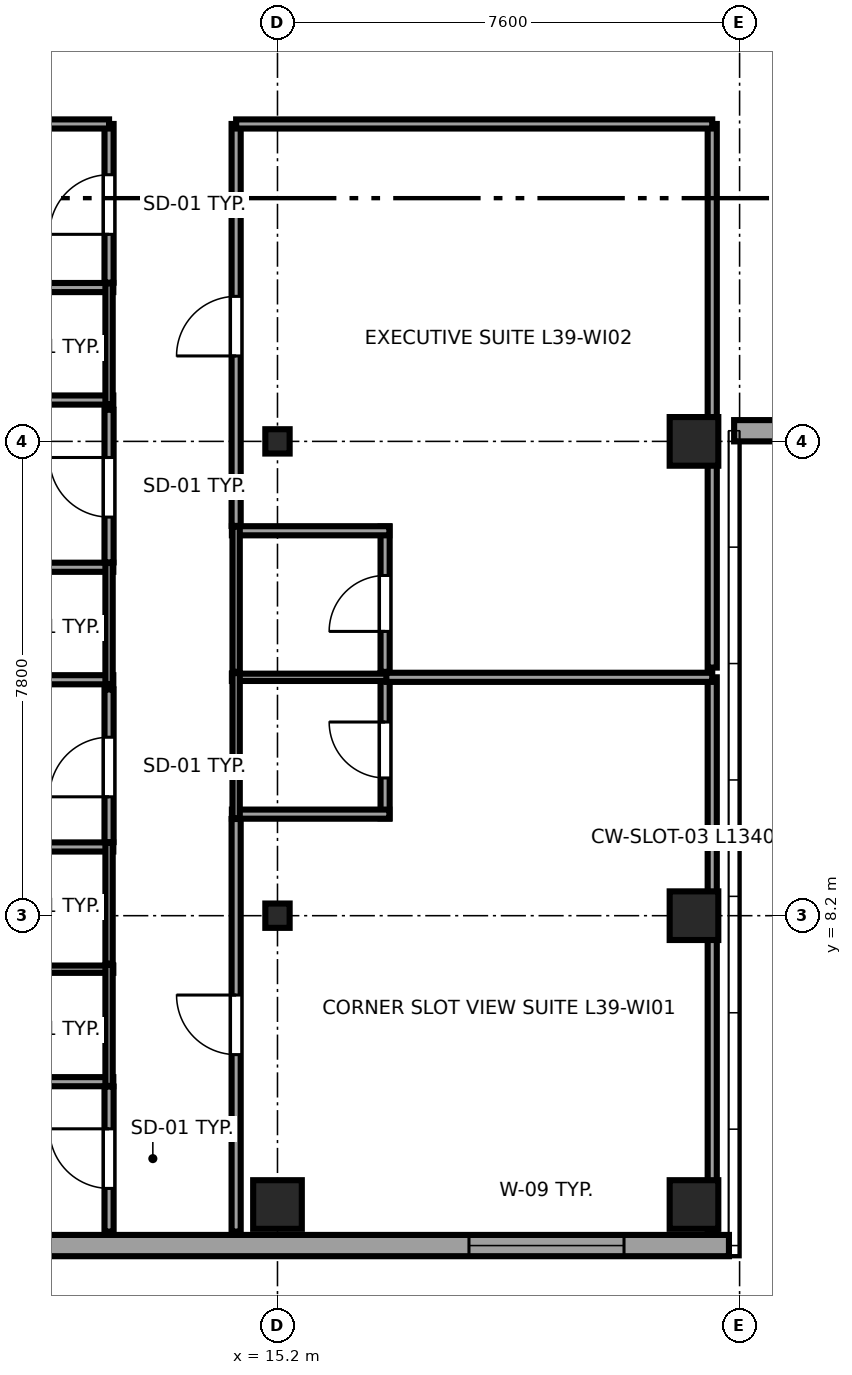
"""IFC4 building model, lengths in metres.
Left out: names, types, materials, properties, quantities, classifications, styles, units other than length and angle.
Written with IfcOpenShell. Run it as: python <this file> out.ifc"""

import sys

from ifc_helpers import new_model, si_unit, direction, frame, frame_2d, origin, origin_2d, place, context, subcontext, project, spatial, rectangle, i_section, extrude, source, transform, mapped, element, fill, save


model = new_model("IFC4")
c1 = context("Model", 3, precision=1e-05, world=origin(), true_north=direction((0.0, 1.0)))
c2 = subcontext(c1, "Body", "Model", "MODEL_VIEW")
j1 = project(units=[si_unit("LENGTHUNIT", "METRE"), si_unit("PLANEANGLEUNIT", "RADIAN")], contexts=[c1])
p1 = place(None, origin())
s1 = spatial("IfcSite", under=j1, at=p1, CompositionType="ELEMENT")
p2 = place(p1, origin())
s2 = spatial("IfcBuilding", under=s1, at=p2, CompositionType="ELEMENT")
p3 = place(p2, frame((0.0, 0.0, 150.6)))
s3 = spatial("IfcBuildingStorey", under=s2, at=p3, CompositionType="ELEMENT", Elevation=150.6)
m1 = source(origin(), c2, "Body", "SweptSolid", [
    extrude(rectangle(XDim=0.8, YDim=0.8, at=origin_2d()), origin(), (0.0, 0.0, 1.0), 3.55),
])
p4 = place(p3, frame((15.2, 3.45, 0.0), z_axis=(0.0, 0.0, 1.0), x_axis=(1.0, 0.0, 0.0)))
e1 = element("IfcColumn", 1, at=p4, inside=s3, PredefinedType="COLUMN", context=c2, shape_type="MappedRepresentation", body=[
    mapped(m1, transform((0.0, 0.0, 0.0), x_axis=(1.0, 0.0, 0.0), y_axis=(0.0, 1.0, 0.0), z_axis=(0.0, 0.0, 1.0), scale=1.0)),
])
m2 = source(origin(), c2, "Body", "SweptSolid", [
    extrude(i_section(OverallWidth=0.4, OverallDepth=0.4, WebThickness=0.02, FlangeThickness=0.035, at=origin_2d()), origin(), (0.0, 0.0, 1.0), 3.55),
])
for number, where, z_axis, x_axis in (
    (2, (15.2, 8.2, 0.0), (0.0, 0.0, 1.0), (1.0, 0.0, 0.0)),
    (3, (15.2, 16.0, 0.0), (0.0, 0.0, 1.0), (1.0, 0.0, 0.0)),
):
    element("IfcColumn", number, at=place(p3, frame(where, z_axis=z_axis, x_axis=x_axis)), inside=s3, PredefinedType="COLUMN", context=c2, shape_type="MappedRepresentation", body=[
        mapped(m2, transform((0.0, 0.0, 0.0), x_axis=(1.0, 0.0, 0.0), y_axis=(0.0, 1.0, 0.0), z_axis=(0.0, 0.0, 1.0), scale=1.0)),
    ])
for number, where, z_axis, x_axis in (
    (4, (22.05, 3.45, 0.0), (0.0, 0.0, 1.0), (1.0, 0.0, 0.0)),
    (5, (22.05, 8.2, 0.0), (0.0, 0.0, 1.0), (1.0, 0.0, 0.0)),
    (6, (22.05, 16.0, 0.0), (0.0, 0.0, 1.0), (1.0, 0.0, 0.0)),
):
    element("IfcColumn", number, at=place(p3, frame(where, z_axis=z_axis, x_axis=x_axis)), inside=s3, PredefinedType="COLUMN", context=c2, shape_type="MappedRepresentation", body=[
        mapped(m1, transform((0.0, 0.0, 0.0), x_axis=(1.0, 0.0, 0.0), y_axis=(0.0, 1.0, 0.0), z_axis=(0.0, 0.0, 1.0), scale=1.0)),
    ])
p5 = place(p3, frame((7.017, 2.775, 0.0), z_axis=(0.0, 0.0, 1.0), x_axis=(1.0, 0.0, 0.0)))
e7 = element("IfcWall", 7, at=p5, inside=s3, PredefinedType="SOLIDWALL", context=c2, shape_type="SweptSolid", body=[
    extrude(rectangle(XDim=15.608, YDim=0.35, at=frame_2d((7.804, 0.0))), origin(), (0.0, 0.0, 1.0), 3.37),
])
p6 = place(p5, frame((1.726, 0.0, 0.68)))
e8 = element("IfcOpeningElement", 8, at=p6, cuts=e7, PredefinedType="OPENING", context=c2, shape_type="SweptSolid", body=[
    extrude(rectangle(XDim=2.55, YDim=1.92, at=frame_2d((1.275, 0.96))), frame((0.0, 0.185, 0.0), z_axis=(0.0, -1.0, 0.0), x_axis=(1.0, 0.0, 0.0)), (0.0, 0.0, 1.0), 0.37),
])
p7 = place(p5, frame((11.332, 0.0, 0.68)))
e9 = element("IfcOpeningElement", 9, at=p7, cuts=e7, PredefinedType="OPENING", context=c2, shape_type="SweptSolid", body=[
    extrude(rectangle(XDim=2.55, YDim=1.92, at=frame_2d((1.275, 0.96))), frame((0.0, 0.185, 0.0), z_axis=(0.0, -1.0, 0.0), x_axis=(1.0, 0.0, 0.0)), (0.0, 0.0, 1.0), 0.37),
])
p8 = place(p3, frame((22.71, 16.175, 0.0), z_axis=(0.0, 0.0, 1.0), x_axis=(1.0, 0.0, 0.0)))
e10 = element("IfcWall", 10, at=p8, inside=s3, PredefinedType="SOLIDWALL", context=c2, shape_type="SweptSolid", body=[
    extrude(rectangle(XDim=11.58, YDim=0.35, at=frame_2d((5.79, 0.0))), origin(), (0.0, 0.0, 1.0), 2.16),
])
p9 = place(p3, frame((9.91, 5.47, 0.0), z_axis=(0.0, 0.0, 1.0), x_axis=(1.0, 0.0, 0.0)))
e11 = element("IfcWall", 11, at=p9, inside=s3, PredefinedType="PARTITIONING", context=c2, shape_type="SweptSolid", body=[
    extrude(rectangle(XDim=2.59, YDim=0.15, at=frame_2d((1.295, 0.0))), origin(), (0.0, 0.0, 1.0), 3.37),
])
p10 = place(p3, frame((9.91, 7.32, 0.0), z_axis=(0.0, 0.0, 1.0), x_axis=(1.0, 0.0, 0.0)))
e12 = element("IfcWall", 12, at=p10, inside=s3, PredefinedType="PLUMBINGWALL", context=c2, shape_type="SweptSolid", body=[
    extrude(rectangle(XDim=2.59, YDim=0.12, at=frame_2d((1.295, 0.0))), origin(), (0.0, 0.0, 1.0), 3.37),
])
p11 = place(p3, frame((12.43, 5.4, 0.0), z_axis=(0.0, 0.0, 1.0), x_axis=(0.0, 1.0, 0.0)))
e13 = element("IfcWall", 13, at=p11, inside=s3, PredefinedType="PLUMBINGWALL", context=c2, shape_type="SweptSolid", body=[
    extrude(rectangle(XDim=1.99, YDim=0.12, at=frame_2d((0.995, 0.0))), origin(), (0.0, 0.0, 1.0), 3.37),
])
p12 = place(p3, frame((9.91, 9.33, 0.0), z_axis=(0.0, 0.0, 1.0), x_axis=(1.0, 0.0, 0.0)))
e14 = element("IfcWall", 14, at=p12, inside=s3, PredefinedType="PARTITIONING", context=c2, shape_type="SweptSolid", body=[
    extrude(rectangle(XDim=2.59, YDim=0.15, at=frame_2d((1.295, 0.0))), origin(), (0.0, 0.0, 1.0), 3.37),
])
p13 = place(p3, frame((12.43, 7.41, 0.0), z_axis=(0.0, 0.0, 1.0), x_axis=(0.0, 1.0, 0.0)))
e15 = element("IfcWall", 15, at=p13, inside=s3, PredefinedType="PLUMBINGWALL", context=c2, shape_type="SweptSolid", body=[
    extrude(rectangle(XDim=1.99, YDim=0.12, at=frame_2d((0.995, 0.0))), origin(), (0.0, 0.0, 1.0), 3.37),
])
p14 = place(p3, frame((3.005, 12.08, 0.0), z_axis=(0.0, 0.0, 1.0), x_axis=(1.0, 0.0, 0.0)))
e16 = element("IfcWall", 16, at=p14, inside=s3, PredefinedType="PARTITIONING", context=c2, shape_type="SweptSolid", body=[
    extrude(rectangle(XDim=9.495, YDim=0.15, at=frame_2d((4.748, 0.0))), origin(), (0.0, 0.0, 1.0), 3.37),
])
p15 = place(p3, frame((9.91, 13.93, 0.0), z_axis=(0.0, 0.0, 1.0), x_axis=(1.0, 0.0, 0.0)))
e17 = element("IfcWall", 17, at=p15, inside=s3, PredefinedType="PARTITIONING", context=c2, shape_type="SweptSolid", body=[
    extrude(rectangle(XDim=2.59, YDim=0.15, at=frame_2d((1.295, 0.0))), origin(), (0.0, 0.0, 1.0), 3.37),
])
p16 = place(p3, frame((12.43, 12.01, 0.0), z_axis=(0.0, 0.0, 1.0), x_axis=(0.0, 1.0, 0.0)))
e18 = element("IfcWall", 18, at=p16, inside=s3, PredefinedType="PLUMBINGWALL", context=c2, shape_type="SweptSolid", body=[
    extrude(rectangle(XDim=1.99, YDim=0.12, at=frame_2d((0.995, 0.0))), origin(), (0.0, 0.0, 1.0), 3.37),
])
p17 = place(p3, frame((3.005, 16.68, 0.0), z_axis=(0.0, 0.0, 1.0), x_axis=(1.0, 0.0, 0.0)))
e19 = element("IfcWall", 19, at=p17, inside=s3, PredefinedType="PARTITIONING", context=c2, shape_type="SweptSolid", body=[
    extrude(rectangle(XDim=9.495, YDim=0.15, at=frame_2d((4.748, 0.0))), origin(), (0.0, 0.0, 1.0), 3.37),
])
p18 = place(p3, frame((9.91, 18.53, 0.0), z_axis=(0.0, 0.0, 1.0), x_axis=(1.0, 0.0, 0.0)))
e20 = element("IfcWall", 20, at=p18, inside=s3, PredefinedType="PARTITIONING", context=c2, shape_type="SweptSolid", body=[
    extrude(rectangle(XDim=2.59, YDim=0.15, at=frame_2d((1.295, 0.0))), origin(), (0.0, 0.0, 1.0), 3.37),
])
p19 = place(p3, frame((12.43, 16.61, 0.0), z_axis=(0.0, 0.0, 1.0), x_axis=(0.0, 1.0, 0.0)))
e21 = element("IfcWall", 21, at=p19, inside=s3, PredefinedType="PLUMBINGWALL", context=c2, shape_type="SweptSolid", body=[
    extrude(rectangle(XDim=1.99, YDim=0.12, at=frame_2d((0.995, 0.0))), origin(), (0.0, 0.0, 1.0), 3.37),
])
p20 = place(p3, frame((16.97, 9.8, 0.0), z_axis=(0.0, 0.0, 1.0), x_axis=(0.0, 1.0, 0.0)))
e22 = element("IfcWall", 22, at=p20, inside=s3, PredefinedType="PARTITIONING", context=c2, shape_type="SweptSolid", body=[
    extrude(rectangle(XDim=2.39, YDim=0.15, at=frame_2d((1.195, 0.0))), origin(), (0.0, 0.0, 1.0), 3.37),
])
p21 = place(p20, frame((0.665, 0.0, 0.0)))
e23 = element("IfcOpeningElement", 23, at=p21, cuts=e22, PredefinedType="OPENING", context=c2, shape_type="SweptSolid", body=[
    extrude(rectangle(XDim=0.92, YDim=2.01, at=frame_2d((0.46, 1.005))), frame((0.0, 0.085, 0.0), z_axis=(0.0, -1.0, 0.0), x_axis=(1.0, 0.0, 0.0)), (0.0, 0.0, 1.0), 0.17),
])
p22 = place(p3, frame((14.45, 9.87, 0.0), z_axis=(0.0, 0.0, 1.0), x_axis=(1.0, 0.0, 0.0)))
e24 = element("IfcWall", 24, at=p22, inside=s3, PredefinedType="PARTITIONING", context=c2, shape_type="SweptSolid", body=[
    extrude(rectangle(XDim=2.59, YDim=0.15, at=frame_2d((1.295, 0.0))), origin(), (0.0, 0.0, 1.0), 3.37),
])
p23 = place(p3, frame((14.45, 12.12, 0.0), z_axis=(0.0, 0.0, 1.0), x_axis=(1.0, 0.0, 0.0)))
e25 = element("IfcWall", 25, at=p23, inside=s3, PredefinedType="PLUMBINGWALL", context=c2, shape_type="SweptSolid", body=[
    extrude(rectangle(XDim=2.59, YDim=0.12, at=frame_2d((1.295, 0.0))), origin(), (0.0, 0.0, 1.0), 3.37),
])
p24 = place(p3, frame((14.52, 9.8, 0.0), z_axis=(0.0, 0.0, 1.0), x_axis=(0.0, 1.0, 0.0)))
e26 = element("IfcWall", 26, at=p24, inside=s3, PredefinedType="PLUMBINGWALL", context=c2, shape_type="SweptSolid", body=[
    extrude(rectangle(XDim=2.39, YDim=0.12, at=frame_2d((1.195, 0.0))), origin(), (0.0, 0.0, 1.0), 3.37),
])
p25 = place(p3, frame((16.97, 12.21, 0.0), z_axis=(0.0, 0.0, 1.0), x_axis=(0.0, 1.0, 0.0)))
e27 = element("IfcWall", 27, at=p25, inside=s3, PredefinedType="PARTITIONING", context=c2, shape_type="SweptSolid", body=[
    extrude(rectangle(XDim=2.39, YDim=0.15, at=frame_2d((1.195, 0.0))), origin(), (0.0, 0.0, 1.0), 3.37),
])
p26 = place(p25, frame((0.665, 0.0, 0.0)))
e28 = element("IfcOpeningElement", 28, at=p26, cuts=e27, PredefinedType="OPENING", context=c2, shape_type="SweptSolid", body=[
    extrude(rectangle(XDim=0.92, YDim=2.01, at=frame_2d((0.46, 1.005))), frame((0.0, 0.085, 0.0), z_axis=(0.0, -1.0, 0.0), x_axis=(1.0, 0.0, 0.0)), (0.0, 0.0, 1.0), 0.17),
])
p27 = place(p3, frame((14.45, 14.53, 0.0), z_axis=(0.0, 0.0, 1.0), x_axis=(1.0, 0.0, 0.0)))
e29 = element("IfcWall", 29, at=p27, inside=s3, PredefinedType="PARTITIONING", context=c2, shape_type="SweptSolid", body=[
    extrude(rectangle(XDim=2.59, YDim=0.15, at=frame_2d((1.295, 0.0))), origin(), (0.0, 0.0, 1.0), 3.37),
])
p28 = place(p3, frame((14.52, 12.21, 0.0), z_axis=(0.0, 0.0, 1.0), x_axis=(0.0, 1.0, 0.0)))
e30 = element("IfcWall", 30, at=p28, inside=s3, PredefinedType="PLUMBINGWALL", context=c2, shape_type="SweptSolid", body=[
    extrude(rectangle(XDim=2.39, YDim=0.12, at=frame_2d((1.195, 0.0))), origin(), (0.0, 0.0, 1.0), 3.37),
])
p29 = place(p3, frame((12.43, 3.005, 0.0), z_axis=(0.0, 0.0, 1.0), x_axis=(0.0, 1.0, 0.0)))
e31 = element("IfcWall", 31, at=p29, inside=s3, PredefinedType="PARTITIONING", context=c2, shape_type="SweptSolid", body=[
    extrude(rectangle(XDim=2.385, YDim=0.15, at=frame_2d((1.192, 0.0))), origin(), (0.0, 0.0, 1.0), 3.37),
])
p30 = place(p29, frame((0.71, 0.0, 0.0)))
e32 = element("IfcOpeningElement", 32, at=p30, cuts=e31, PredefinedType="OPENING", context=c2, shape_type="SweptSolid", body=[
    extrude(rectangle(XDim=0.98, YDim=2.12, at=frame_2d((0.49, 1.06))), frame((0.0, 0.085, 0.0), z_axis=(0.0, -1.0, 0.0), x_axis=(1.0, 0.0, 0.0)), (0.0, 0.0, 1.0), 0.17),
])
p31 = place(p3, frame((12.43, 9.41, 0.0), z_axis=(0.0, 0.0, 1.0), x_axis=(0.0, 1.0, 0.0)))
e33 = element("IfcWall", 33, at=p31, inside=s3, PredefinedType="PARTITIONING", context=c2, shape_type="SweptSolid", body=[
    extrude(rectangle(XDim=2.51, YDim=0.15, at=frame_2d((1.255, 0.0))), origin(), (0.0, 0.0, 1.0), 3.37),
])
p32 = place(p31, frame((0.745, 0.0, 0.0)))
e34 = element("IfcOpeningElement", 34, at=p32, cuts=e33, PredefinedType="OPENING", context=c2, shape_type="SweptSolid", body=[
    extrude(rectangle(XDim=0.98, YDim=2.12, at=frame_2d((0.49, 1.06))), frame((0.0, 0.085, 0.0), z_axis=(0.0, -1.0, 0.0), x_axis=(1.0, 0.0, 0.0)), (0.0, 0.0, 1.0), 0.17),
])
p33 = place(p3, frame((12.43, 14.01, 0.0), z_axis=(0.0, 0.0, 1.0), x_axis=(0.0, 1.0, 0.0)))
e35 = element("IfcWall", 35, at=p33, inside=s3, PredefinedType="PARTITIONING", context=c2, shape_type="SweptSolid", body=[
    extrude(rectangle(XDim=2.51, YDim=0.15, at=frame_2d((1.255, 0.0))), origin(), (0.0, 0.0, 1.0), 3.37),
])
p34 = place(p33, frame((0.745, 0.0, 0.0)))
e36 = element("IfcOpeningElement", 36, at=p34, cuts=e35, PredefinedType="OPENING", context=c2, shape_type="SweptSolid", body=[
    extrude(rectangle(XDim=0.98, YDim=2.12, at=frame_2d((0.49, 1.06))), frame((0.0, 0.085, 0.0), z_axis=(0.0, -1.0, 0.0), x_axis=(1.0, 0.0, 0.0)), (0.0, 0.0, 1.0), 0.17),
])
p35 = place(p3, frame((12.43, 18.61, 0.0), z_axis=(0.0, 0.0, 1.0), x_axis=(0.0, 1.0, 0.0)))
e37 = element("IfcWall", 37, at=p35, inside=s3, PredefinedType="PARTITIONING", context=c2, shape_type="SweptSolid", body=[
    extrude(rectangle(XDim=2.61, YDim=0.15, at=frame_2d((1.305, 0.0))), origin(), (0.0, 0.0, 1.0), 3.37),
])
p36 = place(p35, frame((0.795, 0.0, 0.0)))
e38 = element("IfcOpeningElement", 38, at=p36, cuts=e37, PredefinedType="OPENING", context=c2, shape_type="SweptSolid", body=[
    extrude(rectangle(XDim=0.98, YDim=2.12, at=frame_2d((0.49, 1.06))), frame((0.0, 0.085, 0.0), z_axis=(0.0, -1.0, 0.0), x_axis=(1.0, 0.0, 0.0)), (0.0, 0.0, 1.0), 0.17),
])
p37 = place(p3, frame((3.005, 21.22, 0.0), z_axis=(0.0, 0.0, 1.0), x_axis=(1.0, 0.0, 0.0)))
e39 = element("IfcWall", 39, at=p37, inside=s3, PredefinedType="PARTITIONING", context=c2, shape_type="SweptSolid", body=[
    extrude(rectangle(XDim=9.425, YDim=0.15, at=frame_2d((4.712, 0.0))), origin(), (0.0, 0.0, 1.0), 3.37),
])
p38 = place(p3, frame((14.52, 3.005, 0.0), z_axis=(0.0, 0.0, 1.0), x_axis=(0.0, 1.0, 0.0)))
e40 = element("IfcWall", 40, at=p38, inside=s3, PredefinedType="PARTITIONING", context=c2, shape_type="SweptSolid", body=[
    extrude(rectangle(XDim=6.785, YDim=0.15, at=frame_2d((3.393, 0.0))), origin(), (0.0, 0.0, 1.0), 3.37),
])
p39 = place(p38, frame((2.91, 0.0, 0.0)))
e41 = element("IfcOpeningElement", 41, at=p39, cuts=e40, PredefinedType="OPENING", context=c2, shape_type="SweptSolid", body=[
    extrude(rectangle(XDim=0.98, YDim=2.12, at=frame_2d((0.49, 1.06))), frame((0.0, 0.085, 0.0), z_axis=(0.0, -1.0, 0.0), x_axis=(1.0, 0.0, 0.0)), (0.0, 0.0, 1.0), 0.17),
])
p40 = place(p3, frame((22.35, 3.005, 0.0), z_axis=(0.0, 0.0, 1.0), x_axis=(0.0, 1.0, 0.0)))
e42 = element("IfcWall", 42, at=p40, inside=s3, PredefinedType="PARTITIONING", context=c2, shape_type="SweptSolid", body=[
    extrude(rectangle(XDim=9.115, YDim=0.15, at=frame_2d((4.558, 0.0))), origin(), (0.0, 0.0, 1.0), 2.16),
])
p41 = place(p3, frame((16.99, 12.12, 0.0), z_axis=(0.0, 0.0, 1.0), x_axis=(1.0, 0.0, 0.0)))
e43 = element("IfcWall", 43, at=p41, inside=s3, PredefinedType="PARTITIONING", context=c2, shape_type="SweptSolid", body=[
    extrude(rectangle(XDim=5.36, YDim=0.15, at=frame_2d((2.68, 0.0))), origin(), (0.0, 0.0, 1.0), 3.37),
])
p42 = place(p3, frame((14.52, 14.61, 0.0), z_axis=(0.0, 0.0, 1.0), x_axis=(0.0, 1.0, 0.0)))
e44 = element("IfcWall", 44, at=p42, inside=s3, PredefinedType="PARTITIONING", context=c2, shape_type="SweptSolid", body=[
    extrude(rectangle(XDim=6.61, YDim=0.15, at=frame_2d((3.305, 0.0))), origin(), (0.0, 0.0, 1.0), 3.37),
])
p43 = place(p42, frame((2.795, 0.0, 0.0)))
e45 = element("IfcOpeningElement", 45, at=p43, cuts=e44, PredefinedType="OPENING", context=c2, shape_type="SweptSolid", body=[
    extrude(rectangle(XDim=0.98, YDim=2.12, at=frame_2d((0.49, 1.06))), frame((0.0, 0.085, 0.0), z_axis=(0.0, -1.0, 0.0), x_axis=(1.0, 0.0, 0.0)), (0.0, 0.0, 1.0), 0.17),
])
p44 = place(p3, frame((22.35, 12.28, 0.0), z_axis=(0.0, 0.0, 1.0), x_axis=(0.0, 1.0, 0.0)))
e46 = element("IfcWall", 46, at=p44, inside=s3, PredefinedType="PARTITIONING", context=c2, shape_type="SweptSolid", body=[
    extrude(rectangle(XDim=8.94, YDim=0.15, at=frame_2d((4.47, 0.0))), origin(), (0.0, 0.0, 1.0), 2.16),
])
p45 = place(p3, frame((14.52, 21.22, 0.0), z_axis=(0.0, 0.0, 1.0), x_axis=(1.0, 0.0, 0.0)))
e47 = element("IfcWall", 47, at=p45, inside=s3, PredefinedType="PARTITIONING", context=c2, shape_type="SweptSolid", body=[
    extrude(rectangle(XDim=7.83, YDim=0.15, at=frame_2d((3.915, 0.0))), origin(), (0.0, 0.0, 1.0), 3.37),
])
m3 = source(origin(), c2, "Body", "SweptSolid", [
    extrude(rectangle(XDim=2.55, YDim=1.92, at=frame_2d((1.275, 0.96))), frame((0.0, 0.09, 0.0), z_axis=(0.0, -1.0, 0.0), x_axis=(1.0, 0.0, 0.0)), (0.0, 0.0, 1.0), 0.06),
])
p46 = place(p7, origin())
e48 = element("IfcWindow", 48, at=p46, inside=s3, PartitioningType="TRIPLE_PANEL_HORIZONTAL", PredefinedType="WINDOW", context=c2, shape_type="MappedRepresentation", body=[
    mapped(m3, transform((0.0, 0.0, 0.0), x_axis=(1.0, 0.0, 0.0), y_axis=(0.0, 1.0, 0.0), z_axis=(0.0, 0.0, 1.0), scale=1.0)),
])
fill(e9, e48)
m4 = source(origin(), c2, "Body", "SweptSolid", [
    extrude(rectangle(XDim=0.92, YDim=2.01, at=frame_2d((0.46, 1.005))), frame((0.0, 0.025, 0.0), z_axis=(0.0, -1.0, 0.0), x_axis=(1.0, 0.0, 0.0)), (0.0, 0.0, 1.0), 0.05),
])
p47 = place(p21, origin())
e49 = element("IfcDoor", 49, at=p47, inside=s3, OperationType="SINGLE_SWING_RIGHT", PredefinedType="DOOR", context=c2, shape_type="MappedRepresentation", body=[
    mapped(m4, transform((0.0, 0.0, 0.0), x_axis=(1.0, 0.0, 0.0), y_axis=(0.0, 1.0, 0.0), z_axis=(0.0, 0.0, 1.0), scale=1.0)),
])
fill(e23, e49)
p48 = place(p26, origin())
e50 = element("IfcDoor", 50, at=p48, inside=s3, OperationType="SINGLE_SWING_LEFT", PredefinedType="DOOR", context=c2, shape_type="MappedRepresentation", body=[
    mapped(m4, transform((0.0, 0.0, 0.0), x_axis=(1.0, 0.0, 0.0), y_axis=(0.0, 1.0, 0.0), z_axis=(0.0, 0.0, 1.0), scale=1.0)),
])
fill(e28, e50)
m5 = source(origin(), c2, "Body", "SweptSolid", [
    extrude(rectangle(XDim=0.98, YDim=2.12, at=frame_2d((0.49, 1.06))), frame((0.0, 0.025, 0.0), z_axis=(0.0, -1.0, 0.0), x_axis=(1.0, 0.0, 0.0)), (0.0, 0.0, 1.0), 0.05),
])
p49 = place(p30, origin())
e51 = element("IfcDoor", 51, at=p49, inside=s3, OperationType="SINGLE_SWING_RIGHT", PredefinedType="DOOR", context=c2, shape_type="MappedRepresentation", body=[
    mapped(m5, transform((0.0, 0.0, 0.0), x_axis=(1.0, 0.0, 0.0), y_axis=(0.0, 1.0, 0.0), z_axis=(0.0, 0.0, 1.0), scale=1.0)),
])
fill(e32, e51)
p50 = place(p32, origin())
e52 = element("IfcDoor", 52, at=p50, inside=s3, OperationType="SINGLE_SWING_LEFT", PredefinedType="DOOR", context=c2, shape_type="MappedRepresentation", body=[
    mapped(m5, transform((0.0, 0.0, 0.0), x_axis=(1.0, 0.0, 0.0), y_axis=(0.0, 1.0, 0.0), z_axis=(0.0, 0.0, 1.0), scale=1.0)),
])
fill(e34, e52)
p51 = place(p34, origin())
e53 = element("IfcDoor", 53, at=p51, inside=s3, OperationType="SINGLE_SWING_RIGHT", PredefinedType="DOOR", context=c2, shape_type="MappedRepresentation", body=[
    mapped(m5, transform((0.0, 0.0, 0.0), x_axis=(1.0, 0.0, 0.0), y_axis=(0.0, 1.0, 0.0), z_axis=(0.0, 0.0, 1.0), scale=1.0)),
])
fill(e36, e53)
p52 = place(p36, origin())
e54 = element("IfcDoor", 54, at=p52, inside=s3, OperationType="SINGLE_SWING_LEFT", PredefinedType="DOOR", context=c2, shape_type="MappedRepresentation", body=[
    mapped(m5, transform((0.0, 0.0, 0.0), x_axis=(1.0, 0.0, 0.0), y_axis=(0.0, 1.0, 0.0), z_axis=(0.0, 0.0, 1.0), scale=1.0)),
])
fill(e38, e54)
p53 = place(p39, origin())
e55 = element("IfcDoor", 55, at=p53, inside=s3, OperationType="SINGLE_SWING_RIGHT", PredefinedType="DOOR", context=c2, shape_type="MappedRepresentation", body=[
    mapped(m5, transform((0.0, 0.0, 0.0), x_axis=(1.0, 0.0, 0.0), y_axis=(0.0, 1.0, 0.0), z_axis=(0.0, 0.0, 1.0), scale=1.0)),
])
fill(e41, e55)
p54 = place(p43, origin())
e56 = element("IfcDoor", 56, at=p54, inside=s3, OperationType="SINGLE_SWING_LEFT", PredefinedType="DOOR", context=c2, shape_type="MappedRepresentation", body=[
    mapped(m5, transform((0.0, 0.0, 0.0), x_axis=(1.0, 0.0, 0.0), y_axis=(0.0, 1.0, 0.0), z_axis=(0.0, 0.0, 1.0), scale=1.0)),
])
fill(e45, e56)
save(model, sys.argv[1])
